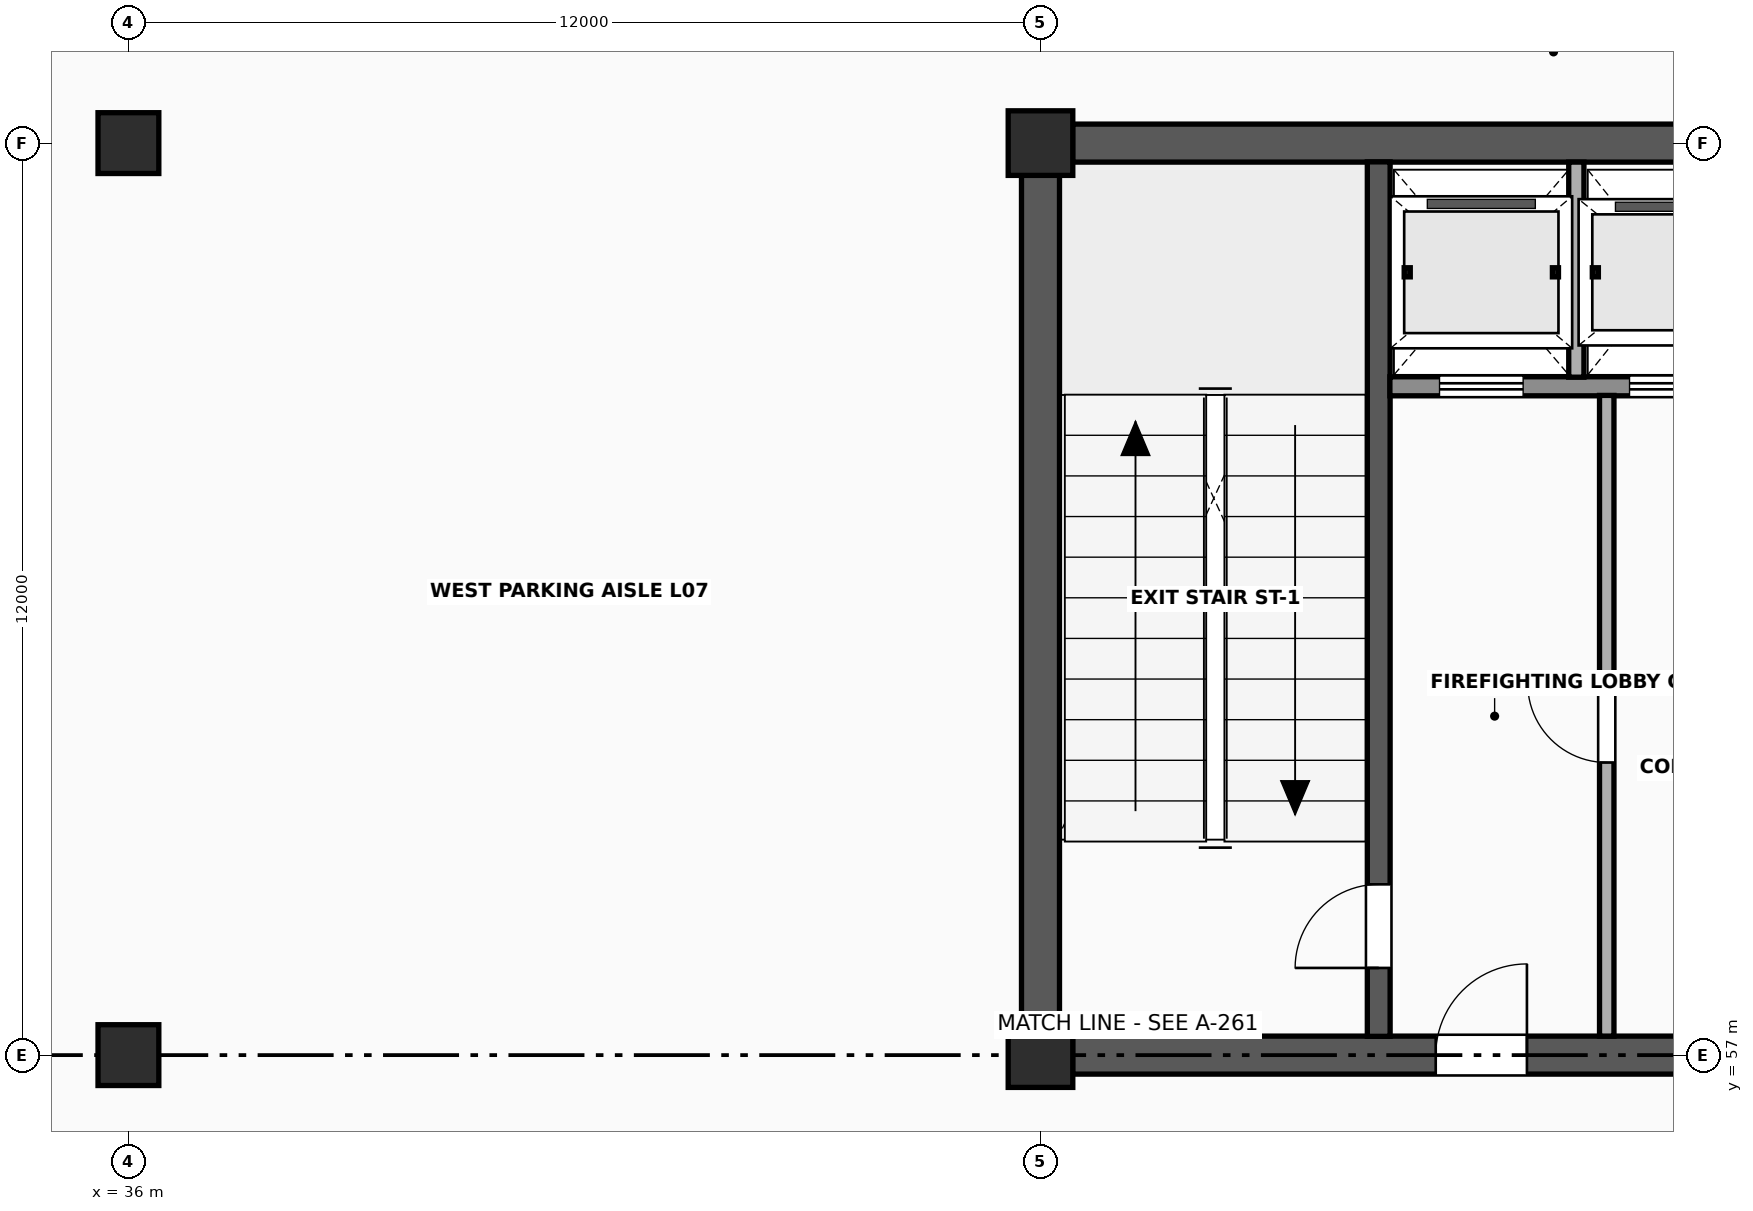
"""IFC4 building model, lengths in metres.
Left out: names, types, materials, properties, quantities, classifications, styles, units other than length and angle.
Written with IfcOpenShell. Run it as: python <this file> out.ifc"""

import sys

from ifc_helpers import new_model, si_unit, direction, frame, frame_2d, origin, origin_2d, place, context, subcontext, project, spatial, rectangle, extrude, element, fill, save


model = new_model("IFC4")
c1 = context("Model", 3, precision=1e-05, world=origin(), true_north=direction((0.0, 1.0)))
c2 = subcontext(c1, "Body", "Model", "MODEL_VIEW")
j1 = project(units=[si_unit("LENGTHUNIT", "METRE"), si_unit("PLANEANGLEUNIT", "RADIAN")], contexts=[c1])
p1 = place(None, origin())
s1 = spatial("IfcSite", under=j1, at=p1, CompositionType="ELEMENT")
p2 = place(p1, origin())
s2 = spatial("IfcBuilding", under=s1, at=p2, CompositionType="ELEMENT")
p3 = place(p2, frame((0.0, 0.0, 28.6)))
s3 = spatial("IfcBuildingStorey", under=s2, at=p3, CompositionType="ELEMENT", Elevation=28.6)
for number, where, z_axis, x_axis in (
    (1, (36.0, 57.0, 0.0), (0.0, 0.0, 1.0), (1.0, 0.0, 0.0)),
    (2, (36.0, 69.0, 0.0), (0.0, 0.0, 1.0), (1.0, 0.0, 0.0)),
):
    element("IfcColumn", number, at=place(p3, frame(where, z_axis=z_axis, x_axis=x_axis)), inside=s3, PredefinedType="COLUMN", context=c2, shape_type="SweptSolid", body=[
        extrude(rectangle(XDim=0.8, YDim=0.8, at=origin_2d()), origin(), (0.0, 0.0, 1.0), 3.8),
    ])
for number, where, z_axis, x_axis in (
    (3, (48.0, 57.0, 0.0), (0.0, 0.0, 1.0), (1.0, 0.0, 0.0)),
    (4, (48.0, 69.0, 0.0), (0.0, 0.0, 1.0), (1.0, 0.0, 0.0)),
):
    element("IfcColumn", number, at=place(p3, frame(where, z_axis=z_axis, x_axis=x_axis)), inside=s3, PredefinedType="COLUMN", context=c2, shape_type="SweptSolid", body=[
        extrude(rectangle(XDim=0.85, YDim=0.85, at=origin_2d()), origin(), (0.0, 0.0, 1.0), 3.8),
    ])
p4 = place(p3, frame((48.422, 57.0, 0.0), z_axis=(0.0, 0.0, 1.0), x_axis=(1.0, 0.0, 0.0)))
e5 = element("IfcWall", 5, at=p4, inside=s3, PredefinedType="SHEAR", context=c2, shape_type="SweptSolid", body=[
    extrude(rectangle(XDim=11.156, YDim=0.5, at=frame_2d((5.578, 0.0))), origin(), (0.0, 0.0, 1.0), 3.553),
])
p5 = place(p4, frame((4.778, 0.0, 0.0)))
e6 = element("IfcOpeningElement", 6, at=p5, cuts=e5, PredefinedType="OPENING", context=c2, shape_type="SweptSolid", body=[
    extrude(rectangle(XDim=1.2, YDim=2.2, at=frame_2d((0.6, 1.1))), frame((0.0, 0.265, 0.0), z_axis=(0.0, -1.0, 0.0), x_axis=(1.0, 0.0, 0.0)), (0.0, 0.0, 1.0), 0.53),
])
p6 = place(p4, frame((8.478, 0.0, 0.0)))
e7 = element("IfcOpeningElement", 7, at=p6, cuts=e5, PredefinedType="OPENING", context=c2, shape_type="SweptSolid", body=[
    extrude(rectangle(XDim=1.5, YDim=2.25, at=frame_2d((0.75, 1.125))), frame((0.0, 0.265, 0.0), z_axis=(0.0, -1.0, 0.0), x_axis=(1.0, 0.0, 0.0)), (0.0, 0.0, 1.0), 0.53),
])
for number, where, z_axis, x_axis in (
    (8, (48.422, 69.0, 0.0), (0.0, 0.0, 1.0), (1.0, 0.0, 0.0)),
    (9, (48.0, 57.422, 0.0), (0.0, 0.0, 1.0), (0.0, 1.0, 0.0)),
):
    element("IfcWall", number, at=place(p3, frame(where, z_axis=z_axis, x_axis=x_axis)), inside=s3, PredefinedType="SHEAR", context=c2, shape_type="SweptSolid", body=[
        extrude(rectangle(XDim=11.156, YDim=0.5, at=frame_2d((5.578, 0.0))), origin(), (0.0, 0.0, 1.0), 3.553),
    ])
p7 = place(p3, frame((52.45, 57.247, 0.0), z_axis=(0.0, 0.0, 1.0), x_axis=(0.0, 1.0, 0.0)))
e10 = element("IfcWall", 10, at=p7, inside=s3, PredefinedType="SHEAR", context=c2, shape_type="SweptSolid", body=[
    extrude(rectangle(XDim=11.506, YDim=0.3, at=frame_2d((5.753, 0.0))), origin(), (0.0, 0.0, 1.0), 3.553),
])
p8 = place(p7, frame((0.9, 0.0, 0.0)))
e11 = element("IfcOpeningElement", 11, at=p8, cuts=e10, PredefinedType="OPENING", context=c2, shape_type="SweptSolid", body=[
    extrude(rectangle(XDim=1.1, YDim=2.2, at=frame_2d((0.55, 1.1))), frame((0.0, 0.165, 0.0), z_axis=(0.0, -1.0, 0.0), x_axis=(1.0, 0.0, 0.0)), (0.0, 0.0, 1.0), 0.33),
])
p9 = place(p3, frame((52.597, 65.8, 0.0), z_axis=(0.0, 0.0, 1.0), x_axis=(1.0, 0.0, 0.0)))
e12 = element("IfcWall", 12, at=p9, inside=s3, PredefinedType="SOLIDWALL", context=c2, shape_type="SweptSolid", body=[
    extrude(rectangle(XDim=7.156, YDim=0.25, at=frame_2d((3.578, 0.0))), origin(), (0.0, 0.0, 1.0), 3.553),
])
p10 = place(p9, frame((0.653, 0.0, 0.0)))
e13 = element("IfcOpeningElement", 13, at=p10, cuts=e12, PredefinedType="OPENING", context=c2, shape_type="SweptSolid", body=[
    extrude(rectangle(XDim=1.1, YDim=2.24, at=frame_2d((0.55, 1.12))), frame((0.0, 0.14, 0.0), z_axis=(0.0, -1.0, 0.0), x_axis=(1.0, 0.0, 0.0)), (0.0, 0.0, 1.0), 0.28),
])
p11 = place(p9, frame((3.153, 0.0, 0.0)))
e14 = element("IfcOpeningElement", 14, at=p11, cuts=e12, PredefinedType="OPENING", context=c2, shape_type="SweptSolid", body=[
    extrude(rectangle(XDim=1.05, YDim=2.2, at=frame_2d((0.525, 1.1))), frame((0.0, 0.14, 0.0), z_axis=(0.0, -1.0, 0.0), x_axis=(1.0, 0.0, 0.0)), (0.0, 0.0, 1.0), 0.28),
])
p12 = place(p9, frame((5.528, 0.0, 0.0)))
e15 = element("IfcOpeningElement", 15, at=p12, cuts=e12, PredefinedType="OPENING", context=c2, shape_type="SweptSolid", body=[
    extrude(rectangle(XDim=1.05, YDim=2.2, at=frame_2d((0.525, 1.1))), frame((0.0, 0.14, 0.0), z_axis=(0.0, -1.0, 0.0), x_axis=(1.0, 0.0, 0.0)), (0.0, 0.0, 1.0), 0.28),
])
p13 = place(p3, frame((55.05, 65.92, 0.0), z_axis=(0.0, 0.0, 1.0), x_axis=(0.0, 1.0, 0.0)))
e16 = element("IfcWall", 16, at=p13, inside=s3, PredefinedType="SOLIDWALL", context=c2, shape_type="SweptSolid", body=[
    extrude(rectangle(XDim=2.83, YDim=0.2, at=frame_2d((1.415, 0.0))), origin(), (0.0, 0.0, 1.0), 3.543),
])
p14 = place(p3, frame((55.45, 57.25, 0.0), z_axis=(0.0, 0.0, 1.0), x_axis=(0.0, 1.0, 0.0)))
e17 = element("IfcWall", 17, at=p14, inside=s3, PredefinedType="SOLIDWALL", context=c2, shape_type="SweptSolid", body=[
    extrude(rectangle(XDim=8.43, YDim=0.19, at=frame_2d((4.215, 0.0))), origin(), (0.0, 0.0, 1.0), 3.543),
])
p15 = place(p14, frame((3.6, 0.0, 0.0)))
e18 = element("IfcOpeningElement", 18, at=p15, cuts=e17, PredefinedType="OPENING", context=c2, shape_type="SweptSolid", body=[
    extrude(rectangle(XDim=1.04, YDim=2.18, at=frame_2d((0.52, 1.09))), frame((0.0, 0.11, 0.0), z_axis=(0.0, -1.0, 0.0), x_axis=(1.0, 0.0, 0.0)), (0.0, 0.0, 1.0), 0.22),
])
p16 = place(p8, origin())
e19 = element("IfcDoor", 19, at=p16, inside=s3, OperationType="SINGLE_SWING_LEFT", PredefinedType="DOOR", context=c2, shape_type="SweptSolid", body=[
    extrude(rectangle(XDim=1.1, YDim=2.2, at=frame_2d((0.55, 1.1))), frame((0.0, 0.025, 0.0), z_axis=(0.0, -1.0, 0.0), x_axis=(1.0, 0.0, 0.0)), (0.0, 0.0, 1.0), 0.05),
])
fill(e11, e19)
p17 = place(p15, origin())
e20 = element("IfcDoor", 20, at=p17, inside=s3, OperationType="SINGLE_SWING_RIGHT", PredefinedType="DOOR", context=c2, shape_type="SweptSolid", body=[
    extrude(rectangle(XDim=1.04, YDim=2.18, at=frame_2d((0.52, 1.09))), frame((0.0, 0.025, 0.0), z_axis=(0.0, -1.0, 0.0), x_axis=(1.0, 0.0, 0.0)), (0.0, 0.0, 1.0), 0.05),
])
fill(e18, e20)
p18 = place(p5, origin())
e21 = element("IfcDoor", 21, at=p18, inside=s3, OperationType="SINGLE_SWING_RIGHT", PredefinedType="DOOR", context=c2, shape_type="SweptSolid", body=[
    extrude(rectangle(XDim=1.2, YDim=2.2, at=frame_2d((0.6, 1.1))), frame((0.0, 0.025, 0.0), z_axis=(0.0, -1.0, 0.0), x_axis=(1.0, 0.0, 0.0)), (0.0, 0.0, 1.0), 0.05),
])
fill(e6, e21)
p19 = place(p10, origin())
e22 = element("IfcDoor", 22, at=p19, inside=s3, OperationType="SLIDING_TO_LEFT", PredefinedType="USERDEFINED", context=c2, shape_type="SweptSolid", body=[
    extrude(rectangle(XDim=1.1, YDim=2.24, at=frame_2d((0.55, 1.12))), frame((0.0, 0.025, 0.0), z_axis=(0.0, -1.0, 0.0), x_axis=(1.0, 0.0, 0.0)), (0.0, 0.0, 1.0), 0.05),
])
fill(e13, e22)
p20 = place(p11, origin())
e23 = element("IfcDoor", 23, at=p20, inside=s3, OperationType="SLIDING_TO_LEFT", PredefinedType="USERDEFINED", context=c2, shape_type="SweptSolid", body=[
    extrude(rectangle(XDim=1.05, YDim=2.2, at=frame_2d((0.525, 1.1))), frame((0.0, 0.025, 0.0), z_axis=(0.0, -1.0, 0.0), x_axis=(1.0, 0.0, 0.0)), (0.0, 0.0, 1.0), 0.05),
])
fill(e14, e23)
save(model, sys.argv[1])
